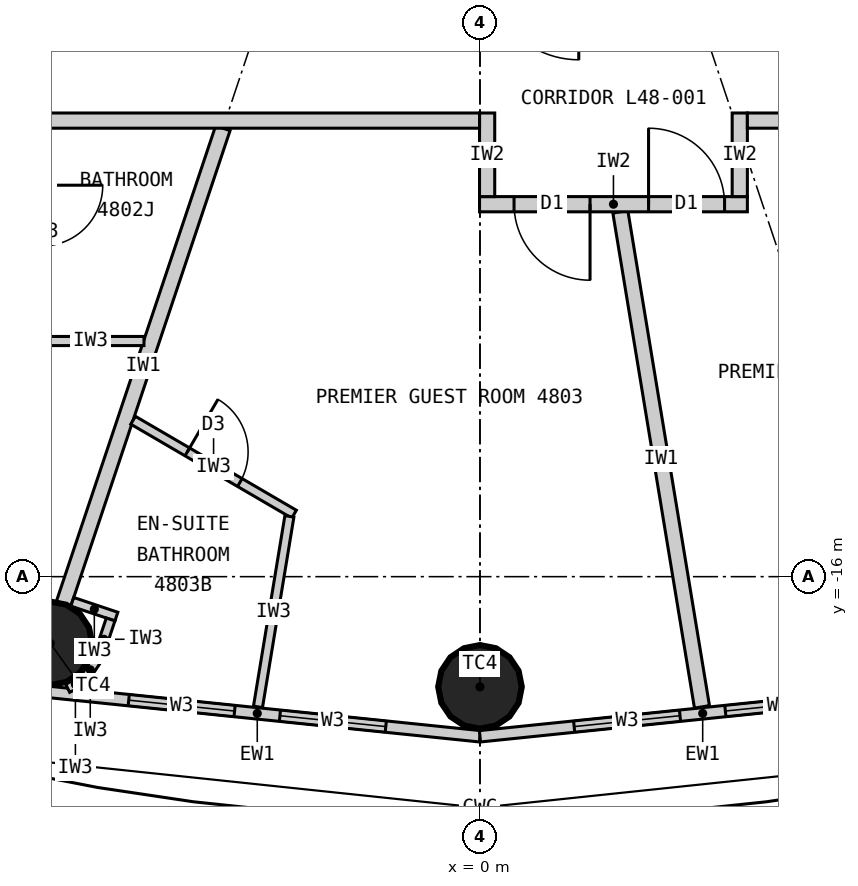
"""IFC4 building model, lengths in metres.
Left out: names, types, materials, properties, quantities, classifications, styles, units other than length and angle.
Written with IfcOpenShell. Run it as: python <this file> out.ifc"""

import sys

from ifc_helpers import new_model, si_unit, direction, frame, frame_2d, origin, origin_2d, place, context, subcontext, project, spatial, rectangle, circle, extrude, element, fill, save


model = new_model("IFC4")
c1 = context("Model", 3, precision=1e-05, world=origin(), true_north=direction((0.0, 1.0)))
c2 = subcontext(c1, "Body", "Model", "MODEL_VIEW")
j1 = project(units=[si_unit("LENGTHUNIT", "METRE"), si_unit("PLANEANGLEUNIT", "RADIAN")], contexts=[c1])
p1 = place(None, origin())
s1 = spatial("IfcSite", under=j1, at=p1, CompositionType="ELEMENT")
p2 = place(p1, origin())
s2 = spatial("IfcBuilding", under=s1, at=p2, CompositionType="ELEMENT")
p3 = place(p2, frame((0.0, 0.0, 179.7)))
s3 = spatial("IfcBuildingStorey", under=s2, at=p3, CompositionType="ELEMENT", Elevation=179.7)
for number, where, z_axis, x_axis in (
    (1, (-5.653, -16.877, 0.0), (0.0, 0.0, 1.0), (1.0, 0.0, 0.0)),
    (2, (0.0, -17.45, 0.0), (0.0, 0.0, 1.0), (1.0, 0.0, 0.0)),
):
    element("IfcColumn", number, at=place(p3, frame(where, z_axis=z_axis, x_axis=x_axis)), inside=s3, PredefinedType="COLUMN", context=c2, shape_type="SweptSolid", body=[
        extrude(circle(Radius=0.55, at=origin_2d()), origin(), (0.0, 0.0, 1.0), 3.3),
    ])
p4 = place(p3, frame((-5.86, -17.497, 0.0), z_axis=(0.0, 0.0, 1.0), x_axis=(0.994751738032, -0.102318032045, 0.0)))
e3 = element("IfcWall", 3, at=p4, inside=s3, PredefinedType="ELEMENTEDWALL", context=c2, shape_type="SweptSolid", body=[
    extrude(rectangle(XDim=5.891, YDim=0.15, at=frame_2d((2.946, 0.0))), origin(), (0.0, 0.0, 1.0), 3.12),
])
p5 = place(p4, frame((1.246, 0.0, 0.9)))
e4 = element("IfcOpeningElement", 4, at=p5, cuts=e3, PredefinedType="OPENING", context=c2, shape_type="SweptSolid", body=[
    extrude(rectangle(XDim=1.4, YDim=1.9, at=frame_2d((0.7, 0.95))), frame((0.0, 0.085, 0.0), z_axis=(0.0, -1.0, 0.0), x_axis=(1.0, 0.0, 0.0)), (0.0, 0.0, 1.0), 0.17),
])
p6 = place(p4, frame((3.246, 0.0, 0.9)))
e5 = element("IfcOpeningElement", 5, at=p6, cuts=e3, PredefinedType="OPENING", context=c2, shape_type="SweptSolid", body=[
    extrude(rectangle(XDim=1.4, YDim=1.9, at=frame_2d((0.7, 0.95))), frame((0.0, 0.085, 0.0), z_axis=(0.0, -1.0, 0.0), x_axis=(1.0, 0.0, 0.0)), (0.0, 0.0, 1.0), 0.17),
])
p7 = place(p3, frame((0.0, -18.1, 0.0), z_axis=(0.0, 0.0, 1.0), x_axis=(0.994751738032, 0.102318032045, 0.0)))
e6 = element("IfcWall", 6, at=p7, inside=s3, PredefinedType="ELEMENTEDWALL", context=c2, shape_type="SweptSolid", body=[
    extrude(rectangle(XDim=5.891, YDim=0.15, at=frame_2d((2.946, 0.0))), origin(), (0.0, 0.0, 1.0), 3.12),
])
p8 = place(p7, frame((1.246, 0.0, 0.9)))
e7 = element("IfcOpeningElement", 7, at=p8, cuts=e6, PredefinedType="OPENING", context=c2, shape_type="SweptSolid", body=[
    extrude(rectangle(XDim=1.4, YDim=1.9, at=frame_2d((0.7, 0.95))), frame((0.0, 0.085, 0.0), z_axis=(0.0, -1.0, 0.0), x_axis=(1.0, 0.0, 0.0)), (0.0, 0.0, 1.0), 0.17),
])
p9 = place(p7, frame((3.246, 0.0, 0.9)))
e8 = element("IfcOpeningElement", 8, at=p9, cuts=e6, PredefinedType="OPENING", context=c2, shape_type="SweptSolid", body=[
    extrude(rectangle(XDim=1.4, YDim=1.9, at=frame_2d((0.7, 0.95))), frame((0.0, 0.085, 0.0), z_axis=(0.0, -1.0, 0.0), x_axis=(1.0, 0.0, 0.0)), (0.0, 0.0, 1.0), 0.17),
])
p10 = place(p3, frame((-3.383, -10.1, 0.0), z_axis=(0.0, 0.0, 1.0), x_axis=(-0.317615120474, -0.948219718866, 0.0)))
e9 = element("IfcWall", 9, at=p10, inside=s3, PredefinedType="PARTITIONING", context=c2, shape_type="SweptSolid", body=[
    extrude(rectangle(XDim=6.597, YDim=0.2, at=frame_2d((3.299, 0.0))), origin(), (0.0, 0.0, 1.0), 2.27),
])
p11 = place(p3, frame((1.847, -11.2, 0.0), z_axis=(0.0, 0.0, 1.0), x_axis=(0.162695449404, -0.986676335352, 0.0)))
e10 = element("IfcWall", 10, at=p11, inside=s3, PredefinedType="PARTITIONING", context=c2, shape_type="SweptSolid", body=[
    extrude(rectangle(XDim=6.601, YDim=0.2, at=frame_2d((3.301, 0.0))), origin(), (0.0, 0.0, 1.0), 3.12),
])
p12 = place(p3, frame((3.518, -11.1, 0.0), z_axis=(0.0, 0.0, 1.0), x_axis=(-1.0, 0.0, 0.0)))
e11 = element("IfcWall", 11, at=p12, inside=s3, PredefinedType="PARTITIONING", context=c2, shape_type="SweptSolid", body=[
    extrude(rectangle(XDim=3.524, YDim=0.2, at=frame_2d((1.762, 0.0))), origin(), (0.0, 0.0, 1.0), 3.12),
])
p13 = place(p12, frame((2.07, 0.0, 0.0)))
e12 = element("IfcOpeningElement", 12, at=p13, cuts=e11, PredefinedType="OPENING", context=c2, shape_type="SweptSolid", body=[
    extrude(rectangle(XDim=1.0, YDim=2.2, at=frame_2d((0.5, 1.1))), frame((0.0, 0.11, 0.0), z_axis=(0.0, -1.0, 0.0), x_axis=(1.0, 0.0, 0.0)), (0.0, 0.0, 1.0), 0.22),
])
p14 = place(p12, frame((0.3, 0.0, 0.0)))
e13 = element("IfcOpeningElement", 13, at=p14, cuts=e11, PredefinedType="OPENING", context=c2, shape_type="SweptSolid", body=[
    extrude(rectangle(XDim=1.0, YDim=2.2, at=frame_2d((0.5, 1.1))), frame((0.0, 0.11, 0.0), z_axis=(0.0, -1.0, 0.0), x_axis=(1.0, 0.0, 0.0)), (0.0, 0.0, 1.0), 0.22),
])
p15 = place(p3, frame((3.418, -9.9, 0.0), z_axis=(0.0, 0.0, 1.0), x_axis=(0.0, -1.0, 0.0)))
e14 = element("IfcWall", 14, at=p15, inside=s3, PredefinedType="PARTITIONING", context=c2, shape_type="SweptSolid", body=[
    extrude(rectangle(XDim=1.1, YDim=0.2, at=frame_2d((0.55, 0.0))), origin(), (0.0, 0.0, 1.0), 3.12),
])
p16 = place(p3, frame((0.094, -9.9, 0.0), z_axis=(0.0, 0.0, 1.0), x_axis=(0.0, -1.0, 0.0)))
e15 = element("IfcWall", 15, at=p16, inside=s3, PredefinedType="PARTITIONING", context=c2, shape_type="SweptSolid", body=[
    extrude(rectangle(XDim=1.1, YDim=0.2, at=frame_2d((0.55, 0.0))), origin(), (0.0, 0.0, 1.0), 2.27),
])
p17 = place(p3, frame((-4.421, -12.9, 0.0), z_axis=(0.0, 0.0, 1.0), x_axis=(-1.0, 0.0, 0.0)))
e16 = element("IfcWall", 16, at=p17, inside=s3, PredefinedType="PARTITIONING", context=c2, shape_type="SweptSolid", body=[
    extrude(rectangle(XDim=1.402, YDim=0.12, at=frame_2d((0.701, 0.0))), origin(), (0.0, 0.0, 1.0), 3.12),
])
p18 = place(p3, frame((-4.564, -13.942, 0.0), z_axis=(0.0, 0.0, 1.0), x_axis=(0.863717519451, -0.503976236139, 0.0)))
e17 = element("IfcWall", 17, at=p18, inside=s3, PredefinedType="PARTITIONING", context=c2, shape_type="SweptSolid", body=[
    extrude(rectangle(XDim=2.453, YDim=0.12, at=frame_2d((1.226, 0.0))), origin(), (0.0, 0.0, 1.0), 3.12),
])
p19 = place(p18, frame((0.826, 0.0, 0.0)))
e18 = element("IfcOpeningElement", 18, at=p19, cuts=e17, PredefinedType="OPENING", context=c2, shape_type="SweptSolid", body=[
    extrude(rectangle(XDim=0.8, YDim=2.1, at=frame_2d((0.4, 1.05))), frame((0.0, 0.07, 0.0), z_axis=(0.0, -1.0, 0.0), x_axis=(1.0, 0.0, 0.0)), (0.0, 0.0, 1.0), 0.14),
])
p20 = place(p3, frame((-2.508, -15.207, 0.0), z_axis=(0.0, 0.0, 1.0), x_axis=(-0.162637365963, -0.986685911115, 0.0)))
e19 = element("IfcWall", 19, at=p20, inside=s3, PredefinedType="PARTITIONING", context=c2, shape_type="SweptSolid", body=[
    extrude(rectangle(XDim=2.54, YDim=0.12, at=frame_2d((1.27, 0.0))), origin(), (0.0, 0.0, 1.0), 3.12),
])
p21 = place(p3, frame((-5.364, -16.331, 0.0), z_axis=(0.0, 0.0, 1.0), x_axis=(0.948283770087, -0.317423835572, 0.0)))
e20 = element("IfcWall", 20, at=p21, inside=s3, PredefinedType="PARTITIONING", context=c2, shape_type="SweptSolid", body=[
    extrude(rectangle(XDim=0.612, YDim=0.12, at=frame_2d((0.306, 0.0))), origin(), (0.0, 0.0, 1.0), 3.12),
])
p22 = place(p3, frame((-4.86, -16.563, 0.0), z_axis=(0.0, 0.0, 1.0), x_axis=(-0.317825321803, -0.948149284038, 0.0)))
e21 = element("IfcWall", 21, at=p22, inside=s3, PredefinedType="PARTITIONING", context=c2, shape_type="SweptSolid", body=[
    extrude(rectangle(XDim=0.55, YDim=0.12, at=frame_2d((0.275, 0.0))), origin(), (0.0, 0.0, 1.0), 3.12),
])
p23 = place(p3, frame((-5.034, -17.084, 0.0), z_axis=(0.0, 0.0, 1.0), x_axis=(-0.552362205726, -0.833604218851, 0.0)))
e22 = element("IfcWall", 22, at=p23, inside=s3, PredefinedType="PARTITIONING", context=c2, shape_type="SweptSolid", body=[
    extrude(rectangle(XDim=0.338, YDim=0.12, at=frame_2d((0.169, 0.0))), origin(), (0.0, 0.0, 1.0), 3.12),
])
p24 = place(p3, frame((-5.221, -17.366, 0.0), z_axis=(0.0, 0.0, 1.0), x_axis=(-0.895067896179, -0.445929883759, 0.0)))
e23 = element("IfcWall", 23, at=p24, inside=s3, PredefinedType="PARTITIONING", context=c2, shape_type="SweptSolid", body=[
    extrude(rectangle(XDim=0.228, YDim=0.12, at=frame_2d((0.114, 0.0))), origin(), (0.0, 0.0, 1.0), 3.12),
])
p25 = place(p3, frame((14.1, -10.0, 0.0), z_axis=(0.0, 0.0, 1.0), x_axis=(-1.0, 0.0, 0.0)))
e24 = element("IfcWall", 24, at=p25, inside=s3, PredefinedType="PARTITIONING", context=c2, shape_type="SweptSolid", body=[
    extrude(rectangle(XDim=10.582, YDim=0.2, at=frame_2d((5.291, 0.0))), origin(), (0.0, 0.0, 1.0), 3.12),
])
p26 = place(p3, frame((-0.006, -10.0, 0.0), z_axis=(0.0, 0.0, 1.0), x_axis=(-1.0, 0.0, 0.0)))
e25 = element("IfcWall", 25, at=p26, inside=s3, PredefinedType="PARTITIONING", context=c2, shape_type="SweptSolid", body=[
    extrude(rectangle(XDim=14.094, YDim=0.2, at=frame_2d((7.047, 0.0))), origin(), (0.0, 0.0, 1.0), 3.12),
])
p27 = place(p26, frame((10.059, 0.0, 0.0)))
e26 = element("IfcOpeningElement", 26, at=p27, cuts=e25, PredefinedType="OPENING", context=c2, shape_type="SweptSolid", body=[
    extrude(rectangle(XDim=1.0, YDim=2.2, at=frame_2d((0.5, 1.1))), frame((0.0, 0.11, 0.0), z_axis=(0.0, -1.0, 0.0), x_axis=(1.0, 0.0, 0.0)), (0.0, 0.0, 1.0), 0.22),
])
p28 = place(p5, origin())
e27 = element("IfcWindow", 27, at=p28, inside=s3, PartitioningType="SINGLE_PANEL", PredefinedType="WINDOW", context=c2, shape_type="SweptSolid", body=[
    extrude(rectangle(XDim=1.4, YDim=1.9, at=frame_2d((0.7, 0.95))), frame((0.0, 0.03, 0.0), z_axis=(0.0, -1.0, 0.0), x_axis=(1.0, 0.0, 0.0)), (0.0, 0.0, 1.0), 0.06),
])
fill(e4, e27)
p29 = place(p6, origin())
e28 = element("IfcWindow", 28, at=p29, inside=s3, PartitioningType="SINGLE_PANEL", PredefinedType="WINDOW", context=c2, shape_type="SweptSolid", body=[
    extrude(rectangle(XDim=1.4, YDim=1.9, at=frame_2d((0.7, 0.95))), frame((0.0, 0.03, 0.0), z_axis=(0.0, -1.0, 0.0), x_axis=(1.0, 0.0, 0.0)), (0.0, 0.0, 1.0), 0.06),
])
fill(e5, e28)
p30 = place(p8, origin())
e29 = element("IfcWindow", 29, at=p30, inside=s3, PartitioningType="SINGLE_PANEL", PredefinedType="WINDOW", context=c2, shape_type="SweptSolid", body=[
    extrude(rectangle(XDim=1.4, YDim=1.9, at=frame_2d((0.7, 0.95))), frame((0.0, 0.03, 0.0), z_axis=(0.0, -1.0, 0.0), x_axis=(1.0, 0.0, 0.0)), (0.0, 0.0, 1.0), 0.06),
])
fill(e7, e29)
p31 = place(p9, origin())
e30 = element("IfcWindow", 30, at=p31, inside=s3, PartitioningType="SINGLE_PANEL", PredefinedType="WINDOW", context=c2, shape_type="SweptSolid", body=[
    extrude(rectangle(XDim=1.4, YDim=1.9, at=frame_2d((0.7, 0.95))), frame((0.0, 0.03, 0.0), z_axis=(0.0, -1.0, 0.0), x_axis=(1.0, 0.0, 0.0)), (0.0, 0.0, 1.0), 0.06),
])
fill(e8, e30)
p32 = place(p19, origin())
e31 = element("IfcDoor", 31, at=p32, inside=s3, OperationType="SINGLE_SWING_LEFT", PredefinedType="DOOR", context=c2, shape_type="SweptSolid", body=[
    extrude(rectangle(XDim=0.8, YDim=2.1, at=frame_2d((0.4, 1.05))), frame((0.0, 0.025, 0.0), z_axis=(0.0, -1.0, 0.0), x_axis=(1.0, 0.0, 0.0)), (0.0, 0.0, 1.0), 0.05),
])
fill(e18, e31)
p33 = place(p13, origin())
e32 = element("IfcDoor", 32, at=p33, inside=s3, OperationType="SINGLE_SWING_LEFT", PredefinedType="DOOR", context=c2, shape_type="SweptSolid", body=[
    extrude(rectangle(XDim=1.0, YDim=2.2, at=frame_2d((0.5, 1.1))), frame((0.0, 0.025, 0.0), z_axis=(0.0, -1.0, 0.0), x_axis=(1.0, 0.0, 0.0)), (0.0, 0.0, 1.0), 0.05),
])
fill(e12, e32)
p34 = place(p14, origin())
e33 = element("IfcDoor", 33, at=p34, inside=s3, OperationType="SINGLE_SWING_RIGHT", PredefinedType="DOOR", context=c2, shape_type="SweptSolid", body=[
    extrude(rectangle(XDim=1.0, YDim=2.2, at=frame_2d((0.5, 1.1))), frame((0.0, 0.025, 0.0), z_axis=(0.0, -1.0, 0.0), x_axis=(1.0, 0.0, 0.0)), (0.0, 0.0, 1.0), 0.05),
])
fill(e13, e33)
save(model, sys.argv[1])
